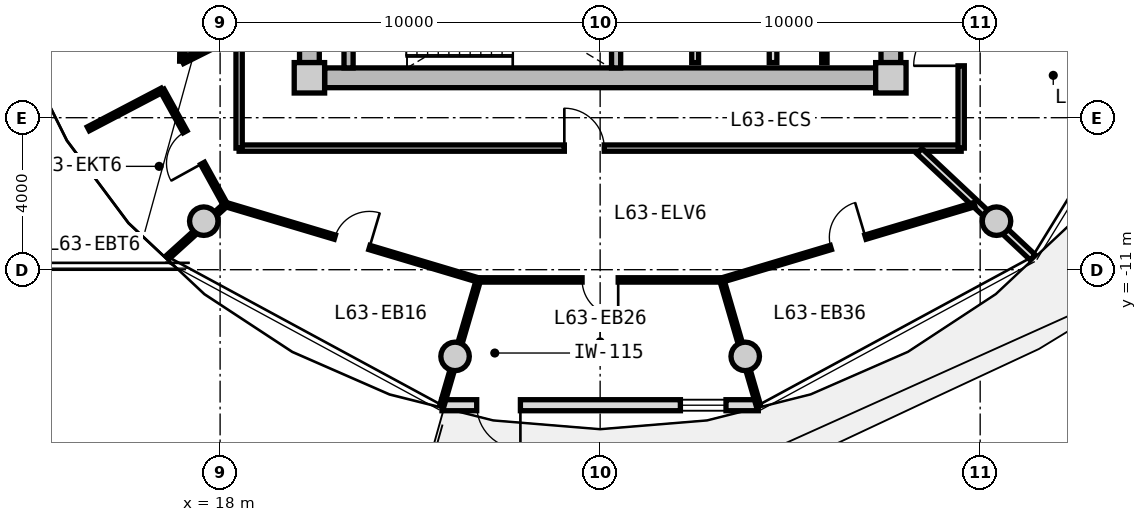
"""IFC4 building model, lengths in metres.
Left out: names, types, materials, properties, quantities, classifications, styles, units other than length and angle.
Written with IfcOpenShell. Run it as: python <this file> out.ifc"""

import sys

from ifc_helpers import new_model, si_unit, direction, frame, frame_2d, origin, origin_2d, place, context, subcontext, project, spatial, rectangle, circle, extrude, source, transform, mapped, element, fill, save


model = new_model("IFC4")
c1 = context("Model", 3, precision=1e-05, world=origin(), true_north=direction((0.0, 1.0)))
c2 = subcontext(c1, "Body", "Model", "MODEL_VIEW")
j1 = project(units=[si_unit("LENGTHUNIT", "METRE"), si_unit("PLANEANGLEUNIT", "RADIAN")], contexts=[c1])
p1 = place(None, origin())
s1 = spatial("IfcSite", under=j1, at=p1, CompositionType="ELEMENT")
p2 = place(p1, origin())
s2 = spatial("IfcBuilding", under=s1, at=p2, CompositionType="ELEMENT")
p3 = place(p2, frame((0.0, 0.0, 203.8)))
s3 = spatial("IfcBuildingStorey", under=s2, at=p3, CompositionType="ELEMENT", Elevation=203.8)
m1 = source(origin(), c2, "Body", "SweptSolid", [
    extrude(rectangle(XDim=0.8, YDim=0.8, at=origin_2d()), origin(), (0.0, 0.0, 1.0), 4.0),
])
for number, where, z_axis, x_axis in (
    (1, (20.35, -5.95, 0.0), (0.0, 0.0, 1.0), (1.0, 0.0, 0.0)),
    (2, (35.65, -5.95, 0.0), (0.0, 0.0, 1.0), (1.0, 0.0, 0.0)),
):
    element("IfcColumn", number, at=place(p3, frame(where, z_axis=z_axis, x_axis=x_axis)), inside=s3, PredefinedType="COLUMN", context=c2, shape_type="MappedRepresentation", body=[
        mapped(m1, transform((0.0, 0.0, 0.0), x_axis=(1.0, 0.0, 0.0), y_axis=(0.0, 1.0, 0.0), z_axis=(0.0, 0.0, 1.0), scale=1.0)),
    ])
m2 = source(origin(), c2, "Body", "SweptSolid", [
    extrude(rectangle(XDim=14.5, YDim=0.52, at=frame_2d((7.25, 0.0))), origin(), (0.0, 0.0, 1.0), 3.71),
])
p4 = place(p3, frame((35.25, -5.95, 0.0), z_axis=(0.0, 0.0, 1.0), x_axis=(-1.0, 0.0, 0.0)))
e3 = element("IfcWall", 3, at=p4, inside=s3, PredefinedType="SHEAR", context=c2, shape_type="MappedRepresentation", body=[
    mapped(m2, transform((0.0, 0.0, 0.0), x_axis=(1.0, 0.0, 0.0), y_axis=(0.0, 1.0, 0.0), z_axis=(0.0, 0.0, 1.0), scale=1.0)),
])
m3 = source(origin(), c2, "Body", "SweptSolid", [
    extrude(rectangle(XDim=11.1, YDim=0.52, at=frame_2d((5.55, 0.0))), origin(), (0.0, 0.0, 1.0), 3.71),
])
p5 = place(p3, frame((20.35, -5.55, 0.0), z_axis=(0.0, 0.0, 1.0), x_axis=(0.0, 1.0, 0.0)))
e4 = element("IfcWall", 4, at=p5, inside=s3, PredefinedType="SHEAR", context=c2, shape_type="MappedRepresentation", body=[
    mapped(m3, transform((0.0, 0.0, 0.0), x_axis=(1.0, 0.0, 0.0), y_axis=(0.0, 1.0, 0.0), z_axis=(0.0, 0.0, 1.0), scale=1.0)),
])
p6 = place(p5, frame((3.8, 0.0, 0.0)))
e5 = element("IfcOpeningElement", 5, at=p6, cuts=e4, PredefinedType="OPENING", context=c2, shape_type="SweptSolid", body=[
    extrude(rectangle(XDim=1.2, YDim=2.15, at=frame_2d((0.6, 1.075))), frame((0.0, 0.27, 0.0), z_axis=(0.0, -1.0, 0.0), x_axis=(1.0, 0.0, 0.0)), (0.0, 0.0, 1.0), 0.54),
])
p7 = place(p3, frame((35.65, 5.55, 0.0), z_axis=(0.0, 0.0, 1.0), x_axis=(0.0, -1.0, 0.0)))
e6 = element("IfcWall", 6, at=p7, inside=s3, PredefinedType="SHEAR", context=c2, shape_type="MappedRepresentation", body=[
    mapped(m3, transform((0.0, 0.0, 0.0), x_axis=(1.0, 0.0, 0.0), y_axis=(0.0, 1.0, 0.0), z_axis=(0.0, 0.0, 1.0), scale=1.0)),
])
p8 = place(p7, frame((5.65, 0.0, 0.0)))
e7 = element("IfcOpeningElement", 7, at=p8, cuts=e6, PredefinedType="OPENING", context=c2, shape_type="SweptSolid", body=[
    extrude(rectangle(XDim=1.2, YDim=2.15, at=frame_2d((0.6, 1.075))), frame((0.0, 0.27, 0.0), z_axis=(0.0, -1.0, 0.0), x_axis=(1.0, 0.0, 0.0)), (0.0, 0.0, 1.0), 0.54),
])
m4 = source(origin(), c2, "Body", "SweptSolid", [
    extrude(circle(Radius=0.375, at=origin_2d()), origin(), (0.0, 0.0, 1.0), 4.0),
])
for number, where, z_axis, x_axis in (
    (8, (17.57, -9.723, 0.0), (0.0, 0.0, 1.0), (1.0, 0.0, 0.0)),
    (9, (24.182, -13.281, 0.0), (0.0, 0.0, 1.0), (1.0, 0.0, 0.0)),
    (10, (31.818, -13.281, 0.0), (0.0, 0.0, 1.0), (1.0, 0.0, 0.0)),
    (11, (38.43, -9.723, 0.0), (0.0, 0.0, 1.0), (1.0, 0.0, 0.0)),
):
    element("IfcColumn", number, at=place(p3, frame(where, z_axis=z_axis, x_axis=x_axis)), inside=s3, PredefinedType="COLUMN", context=c2, shape_type="MappedRepresentation", body=[
        mapped(m4, transform((0.0, 0.0, 0.0), x_axis=(1.0, 0.0, 0.0), y_axis=(0.0, 1.0, 0.0), z_axis=(0.0, 0.0, 1.0), scale=1.0)),
    ])
m5 = source(origin(), c2, "Body", "SweptSolid", [
    extrude(rectangle(XDim=8.324, YDim=0.29, at=frame_2d((4.162, 0.0))), origin(), (0.0, 0.0, 1.0), 3.71),
])
p9 = place(p3, frame((32.162, -14.566, 0.0), z_axis=(0.0, 0.0, 1.0), x_axis=(-1.0, 0.0, 0.0)))
e12 = element("IfcWall", 12, at=p9, inside=s3, PredefinedType="SOLIDWALL", context=c2, shape_type="MappedRepresentation", body=[
    mapped(m5, transform((0.0, 0.0, 0.0), x_axis=(1.0, 0.0, 0.0), y_axis=(0.0, 1.0, 0.0), z_axis=(0.0, 0.0, 1.0), scale=1.0)),
])
p10 = place(p9, frame((6.26, 0.0, 0.0)))
e13 = element("IfcOpeningElement", 13, at=p10, cuts=e12, PredefinedType="OPENING", context=c2, shape_type="SweptSolid", body=[
    extrude(rectangle(XDim=1.15, YDim=2.25, at=frame_2d((0.575, 1.125))), frame((0.0, 0.155, 0.0), z_axis=(0.0, -1.0, 0.0), x_axis=(1.0, 0.0, 0.0)), (0.0, 0.0, 1.0), 0.31),
])
p11 = place(p9, frame((0.85, 0.0, 0.85)))
e14 = element("IfcOpeningElement", 14, at=p11, cuts=e12, PredefinedType="OPENING", context=c2, shape_type="SweptSolid", body=[
    extrude(rectangle(XDim=1.2, YDim=1.5, at=frame_2d((0.6, 0.75))), frame((0.0, 0.155, 0.0), z_axis=(0.0, -1.0, 0.0), x_axis=(1.0, 0.0, 0.0)), (0.0, 0.0, 1.0), 0.31),
])
m6 = source(origin(), c2, "Body", "SweptSolid", [
    extrude(rectangle(XDim=3.24, YDim=0.24, at=frame_2d((1.62, 0.0))), origin(), (0.0, 0.0, 1.0), 3.71),
])
for number, where, z_axis, x_axis in (
    (15, (21.38, -5.69, 0.0), (0.0, 0.0, 1.0), (0.0, 1.0, 0.0)),
    (16, (28.42, -5.69, 0.0), (0.0, 0.0, 1.0), (0.0, 1.0, 0.0)),
):
    element("IfcWall", number, at=place(p3, frame(where, z_axis=z_axis, x_axis=x_axis)), inside=s3, PredefinedType="PARTITIONING", context=c2, shape_type="MappedRepresentation", body=[
        mapped(m6, transform((0.0, 0.0, 0.0), x_axis=(1.0, 0.0, 0.0), y_axis=(0.0, 1.0, 0.0), z_axis=(0.0, 0.0, 1.0), scale=1.0)),
    ])
m7 = source(origin(), c2, "Body", "SweptSolid", [
    extrude(rectangle(XDim=3.8, YDim=0.2, at=frame_2d((1.9, 0.0))), origin(), (0.0, 0.0, 1.0), 3.695),
])
p12 = place(p3, frame((32.55, -5.55, 0.0), z_axis=(0.0, 0.0, 1.0), x_axis=(0.0, 1.0, 0.0)))
e17 = element("IfcWall", 17, at=p12, inside=s3, PredefinedType="PARTITIONING", context=c2, shape_type="MappedRepresentation", body=[
    mapped(m7, transform((0.0, 0.0, 0.0), x_axis=(1.0, 0.0, 0.0), y_axis=(0.0, 1.0, 0.0), z_axis=(0.0, 0.0, 1.0), scale=1.0)),
])
m8 = source(origin(), c2, "Body", "SweptSolid", [
    extrude(rectangle(XDim=4.2, YDim=0.18, at=frame_2d((2.1, 0.0))), origin(), (0.0, 0.0, 1.0), 3.695),
])
p13 = place(p3, frame((30.5, -5.55, 0.0), z_axis=(0.0, 0.0, 1.0), x_axis=(0.0, 1.0, 0.0)))
e18 = element("IfcWall", 18, at=p13, inside=s3, PredefinedType="PARTITIONING", context=c2, shape_type="MappedRepresentation", body=[
    mapped(m8, transform((0.0, 0.0, 0.0), x_axis=(1.0, 0.0, 0.0), y_axis=(0.0, 1.0, 0.0), z_axis=(0.0, 0.0, 1.0), scale=1.0)),
])
m9 = source(origin(), c2, "Body", "SweptSolid", [
    extrude(rectangle(XDim=3.8, YDim=0.14, at=frame_2d((1.9, 0.0))), origin(), (0.0, 0.0, 1.0), 3.695),
])
p14 = place(p3, frame((33.9, -5.55, 0.0), z_axis=(0.0, 0.0, 1.0), x_axis=(0.0, 1.0, 0.0)))
e19 = element("IfcWall", 19, at=p14, inside=s3, PredefinedType="PARTITIONING", context=c2, shape_type="MappedRepresentation", body=[
    mapped(m9, transform((0.0, 0.0, 0.0), x_axis=(1.0, 0.0, 0.0), y_axis=(0.0, 1.0, 0.0), z_axis=(0.0, 0.0, 1.0), scale=1.0)),
])
m10 = source(origin(), c2, "Body", "SweptSolid", [
    extrude(rectangle(XDim=19.0, YDim=0.165, at=frame_2d((9.5, 0.0))), origin(), (0.0, 0.0, 1.0), 3.695),
])
p15 = place(p3, frame((37.5, -7.8, 0.0), z_axis=(0.0, 0.0, 1.0), x_axis=(-1.0, 0.0, 0.0)))
e20 = element("IfcWall", 20, at=p15, inside=s3, PredefinedType="PARTITIONING", context=c2, shape_type="MappedRepresentation", body=[
    mapped(m10, transform((0.0, 0.0, 0.0), x_axis=(1.0, 0.0, 0.0), y_axis=(0.0, 1.0, 0.0), z_axis=(0.0, 0.0, 1.0), scale=1.0)),
])
p16 = place(p15, frame((9.392, 0.0, 0.0)))
e21 = element("IfcOpeningElement", 21, at=p16, cuts=e20, PredefinedType="OPENING", context=c2, shape_type="SweptSolid", body=[
    extrude(rectangle(XDim=1.05, YDim=2.15, at=frame_2d((0.525, 1.075))), frame((0.0, 0.093, 0.0), z_axis=(0.0, -1.0, 0.0), x_axis=(1.0, 0.0, 0.0)), (0.0, 0.0, 1.0), 0.185),
])
m11 = source(origin(), c2, "Body", "SweptSolid", [
    extrude(rectangle(XDim=6.88, YDim=0.165, at=frame_2d((3.44, 0.0))), origin(), (0.0, 0.0, 1.0), 3.695),
])
p17 = place(p3, frame((18.5, -7.8, 0.0), z_axis=(0.0, 0.0, 1.0), x_axis=(0.0, 1.0, 0.0)))
e22 = element("IfcWall", 22, at=p17, inside=s3, PredefinedType="PARTITIONING", context=c2, shape_type="MappedRepresentation", body=[
    mapped(m11, transform((0.0, 0.0, 0.0), x_axis=(1.0, 0.0, 0.0), y_axis=(0.0, 1.0, 0.0), z_axis=(0.0, 0.0, 1.0), scale=1.0)),
])
p18 = place(p3, frame((37.5, -0.92, 0.0), z_axis=(0.0, 0.0, 1.0), x_axis=(0.0, -1.0, 0.0)))
e23 = element("IfcWall", 23, at=p18, inside=s3, PredefinedType="PARTITIONING", context=c2, shape_type="MappedRepresentation", body=[
    mapped(m11, transform((0.0, 0.0, 0.0), x_axis=(1.0, 0.0, 0.0), y_axis=(0.0, 1.0, 0.0), z_axis=(0.0, 0.0, 1.0), scale=1.0)),
])
p19 = place(p18, frame((3.464, 0.0, 0.0)))
e24 = element("IfcOpeningElement", 24, at=p19, cuts=e23, PredefinedType="OPENING", context=c2, shape_type="SweptSolid", body=[
    extrude(rectangle(XDim=1.25, YDim=2.2, at=frame_2d((0.625, 1.1))), frame((0.0, 0.093, 0.0), z_axis=(0.0, -1.0, 0.0), x_axis=(1.0, 0.0, 0.0)), (0.0, 0.0, 1.0), 0.185),
])
m12 = source(origin(), c2, "Body", "SweptSolid", [
    extrude(rectangle(XDim=4.089, YDim=0.19, at=frame_2d((2.044, 0.0))), origin(), (0.0, 0.0, 1.0), 3.295),
])
p20 = place(p3, frame((36.402, -7.88, 0.0), z_axis=(0.0, 0.0, 1.0), x_axis=(0.729401273609, -0.684086092577, 0.0)))
e25 = element("IfcWall", 25, at=p20, inside=s3, PredefinedType="PARTITIONING", context=c2, shape_type="MappedRepresentation", body=[
    mapped(m12, transform((0.0, 0.0, 0.0), x_axis=(1.0, 0.0, 0.0), y_axis=(0.0, 1.0, 0.0), z_axis=(0.0, 0.0, 1.0), scale=1.0)),
])
m13 = source(origin(), c2, "Body", "SweptSolid", [
    extrude(rectangle(XDim=6.936, YDim=0.115, at=frame_2d((3.468, 0.0))), origin(), (0.0, 0.0, 1.0), 3.695),
])
p21 = place(p3, frame((18.151, -9.287, 0.0), z_axis=(0.0, 0.0, 1.0), x_axis=(0.958186895835, -0.286143098205, 0.0)))
e26 = element("IfcWall", 26, at=p21, inside=s3, PredefinedType="PARTITIONING", context=c2, shape_type="MappedRepresentation", body=[
    mapped(m13, transform((0.0, 0.0, 0.0), x_axis=(1.0, 0.0, 0.0), y_axis=(0.0, 1.0, 0.0), z_axis=(0.0, 0.0, 1.0), scale=1.0)),
])
p22 = place(p21, frame((2.993, 0.0, 0.0)))
e27 = element("IfcOpeningElement", 27, at=p22, cuts=e26, PredefinedType="OPENING", context=c2, shape_type="SweptSolid", body=[
    extrude(rectangle(XDim=0.95, YDim=2.1, at=frame_2d((0.475, 1.05))), frame((0.0, 0.067, 0.0), z_axis=(0.0, -1.0, 0.0), x_axis=(1.0, 0.0, 0.0)), (0.0, 0.0, 1.0), 0.135),
])
m14 = source(origin(), c2, "Body", "SweptSolid", [
    extrude(rectangle(XDim=2.072, YDim=0.115, at=frame_2d((1.036, 0.0))), origin(), (0.0, 0.0, 1.0), 3.295),
])
p23 = place(p3, frame((18.151, -9.287, 0.0), z_axis=(0.0, 0.0, 1.0), x_axis=(-0.741410125356, -0.671052178314, 0.0)))
e28 = element("IfcWall", 28, at=p23, inside=s3, PredefinedType="PARTITIONING", context=c2, shape_type="MappedRepresentation", body=[
    mapped(m14, transform((0.0, 0.0, 0.0), x_axis=(1.0, 0.0, 0.0), y_axis=(0.0, 1.0, 0.0), z_axis=(0.0, 0.0, 1.0), scale=1.0)),
])
m15 = source(origin(), c2, "Body", "SweptSolid", [
    extrude(rectangle(XDim=6.404, YDim=0.115, at=frame_2d((3.202, 0.0))), origin(), (0.0, 0.0, 1.0), 3.695),
])
p24 = place(p3, frame((24.798, -11.269, 0.0), z_axis=(0.0, 0.0, 1.0), x_axis=(1.0, 0.0, 0.0)))
e29 = element("IfcWall", 29, at=p24, inside=s3, PredefinedType="PARTITIONING", context=c2, shape_type="MappedRepresentation", body=[
    mapped(m15, transform((0.0, 0.0, 0.0), x_axis=(1.0, 0.0, 0.0), y_axis=(0.0, 1.0, 0.0), z_axis=(0.0, 0.0, 1.0), scale=1.0)),
])
p25 = place(p24, frame((2.727, 0.0, 0.0)))
e30 = element("IfcOpeningElement", 30, at=p25, cuts=e29, PredefinedType="OPENING", context=c2, shape_type="SweptSolid", body=[
    extrude(rectangle(XDim=0.95, YDim=2.1, at=frame_2d((0.475, 1.05))), frame((0.0, 0.067, 0.0), z_axis=(0.0, -1.0, 0.0), x_axis=(1.0, 0.0, 0.0)), (0.0, 0.0, 1.0), 0.135),
])
m16 = source(origin(), c2, "Body", "SweptSolid", [
    extrude(rectangle(XDim=3.454, YDim=0.115, at=frame_2d((1.727, 0.0))), origin(), (0.0, 0.0, 1.0), 3.295),
])
p26 = place(p3, frame((24.798, -11.269, 0.0), z_axis=(0.0, 0.0, 1.0), x_axis=(-0.279348499358, -0.960189781193, 0.0)))
e31 = element("IfcWall", 31, at=p26, inside=s3, PredefinedType="PARTITIONING", context=c2, shape_type="MappedRepresentation", body=[
    mapped(m16, transform((0.0, 0.0, 0.0), x_axis=(1.0, 0.0, 0.0), y_axis=(0.0, 1.0, 0.0), z_axis=(0.0, 0.0, 1.0), scale=1.0)),
])
p27 = place(p3, frame((31.203, -11.272, 0.0), z_axis=(0.0, 0.0, 1.0), x_axis=(0.958186895835, 0.286143098205, 0.0)))
e32 = element("IfcWall", 32, at=p27, inside=s3, PredefinedType="PARTITIONING", context=c2, shape_type="MappedRepresentation", body=[
    mapped(m13, transform((0.0, 0.0, 0.0), x_axis=(1.0, 0.0, 0.0), y_axis=(0.0, 1.0, 0.0), z_axis=(0.0, 0.0, 1.0), scale=1.0)),
])
p28 = place(p27, frame((2.993, 0.0, 0.0)))
e33 = element("IfcOpeningElement", 33, at=p28, cuts=e32, PredefinedType="OPENING", context=c2, shape_type="SweptSolid", body=[
    extrude(rectangle(XDim=0.95, YDim=2.1, at=frame_2d((0.475, 1.05))), frame((0.0, 0.067, 0.0), z_axis=(0.0, -1.0, 0.0), x_axis=(1.0, 0.0, 0.0)), (0.0, 0.0, 1.0), 0.135),
])
m17 = source(origin(), c2, "Body", "SweptSolid", [
    extrude(rectangle(XDim=3.451, YDim=0.115, at=frame_2d((1.726, 0.0))), origin(), (0.0, 0.0, 1.0), 3.295),
])
p29 = place(p3, frame((31.203, -11.272, 0.0), z_axis=(0.0, 0.0, 1.0), x_axis=(0.279361559083, -0.960185981624, 0.0)))
e34 = element("IfcWall", 34, at=p29, inside=s3, PredefinedType="PARTITIONING", context=c2, shape_type="MappedRepresentation", body=[
    mapped(m17, transform((0.0, 0.0, 0.0), x_axis=(1.0, 0.0, 0.0), y_axis=(0.0, 1.0, 0.0), z_axis=(0.0, 0.0, 1.0), scale=1.0)),
])
m18 = source(origin(), c2, "Body", "SweptSolid", [
    extrude(rectangle(XDim=1.638, YDim=0.14, at=frame_2d((0.819, 0.0))), origin(), (0.0, 0.0, 1.0), 3.695),
])
p30 = place(p3, frame((18.47, -4.778, 0.0), z_axis=(0.0, 0.0, 1.0), x_axis=(-0.893919977945, -0.448226586707, 0.0)))
e35 = element("IfcWall", 35, at=p30, inside=s3, PredefinedType="PARTITIONING", context=c2, shape_type="MappedRepresentation", body=[
    mapped(m18, transform((0.0, 0.0, 0.0), x_axis=(1.0, 0.0, 0.0), y_axis=(0.0, 1.0, 0.0), z_axis=(0.0, 0.0, 1.0), scale=1.0)),
])
m19 = source(origin(), c2, "Body", "SweptSolid", [
    extrude(rectangle(XDim=2.759, YDim=0.14, at=frame_2d((1.379, 0.0))), origin(), (0.0, 0.0, 1.0), 3.695),
])
p31 = place(p3, frame((17.005, -5.513, 0.0), z_axis=(0.0, 0.0, 1.0), x_axis=(0.01194710728, 0.999928630767, 0.0)))
e36 = element("IfcWall", 36, at=p31, inside=s3, PredefinedType="PARTITIONING", context=c2, shape_type="MappedRepresentation", body=[
    mapped(m19, transform((0.0, 0.0, 0.0), x_axis=(1.0, 0.0, 0.0), y_axis=(0.0, 1.0, 0.0), z_axis=(0.0, 0.0, 1.0), scale=1.0)),
])
p32 = place(p31, frame((0.919, 0.0, 0.0)))
e37 = element("IfcOpeningElement", 37, at=p32, cuts=e36, PredefinedType="OPENING", context=c2, shape_type="SweptSolid", body=[
    extrude(rectangle(XDim=0.92, YDim=2.1, at=frame_2d((0.46, 1.05))), frame((0.0, 0.08, 0.0), z_axis=(0.0, -1.0, 0.0), x_axis=(1.0, 0.0, 0.0)), (0.0, 0.0, 1.0), 0.16),
])
m20 = source(origin(), c2, "Body", "SweptSolid", [
    extrude(rectangle(XDim=2.193, YDim=0.115, at=frame_2d((1.097, 0.0))), origin(), (0.0, 0.0, 1.0), 3.695),
])
p33 = place(p3, frame((16.475, -6.275, 0.0), z_axis=(0.0, 0.0, 1.0), x_axis=(-0.885783595046, -0.464098505435, 0.0)))
e38 = element("IfcWall", 38, at=p33, inside=s3, PredefinedType="PARTITIONING", context=c2, shape_type="MappedRepresentation", body=[
    mapped(m20, transform((0.0, 0.0, 0.0), x_axis=(1.0, 0.0, 0.0), y_axis=(0.0, 1.0, 0.0), z_axis=(0.0, 0.0, 1.0), scale=1.0)),
])
m21 = source(origin(), c2, "Body", "SweptSolid", [
    extrude(rectangle(XDim=3.45, YDim=0.115, at=frame_2d((1.725, 0.0))), origin(), (0.0, 0.0, 1.0), 3.695),
])
p34 = place(p3, frame((16.475, -6.275, 0.0), z_axis=(0.0, 0.0, 1.0), x_axis=(0.483659007882, -0.875256513312, 0.0)))
e39 = element("IfcWall", 39, at=p34, inside=s3, PredefinedType="PARTITIONING", context=c2, shape_type="MappedRepresentation", body=[
    mapped(m21, transform((0.0, 0.0, 0.0), x_axis=(1.0, 0.0, 0.0), y_axis=(0.0, 1.0, 0.0), z_axis=(0.0, 0.0, 1.0), scale=1.0)),
])
p35 = place(p34, frame((1.25, 0.0, 0.0)))
e40 = element("IfcOpeningElement", 40, at=p35, cuts=e39, PredefinedType="OPENING", context=c2, shape_type="SweptSolid", body=[
    extrude(rectangle(XDim=0.95, YDim=2.1, at=frame_2d((0.475, 1.05))), frame((0.0, 0.067, 0.0), z_axis=(0.0, -1.0, 0.0), x_axis=(1.0, 0.0, 0.0)), (0.0, 0.0, 1.0), 0.135),
])
m22 = source(origin(), c2, "Body", "SweptSolid", [
    extrude(rectangle(XDim=1.15, YDim=2.25, at=frame_2d((0.575, 1.125))), frame((0.0, 0.025, 0.0), z_axis=(0.0, -1.0, 0.0), x_axis=(1.0, 0.0, 0.0)), (0.0, 0.0, 1.0), 0.05),
])
p36 = place(p10, origin())
e41 = element("IfcDoor", 41, at=p36, inside=s3, OperationType="SINGLE_SWING_LEFT", PredefinedType="DOOR", context=c2, shape_type="MappedRepresentation", body=[
    mapped(m22, transform((0.0, 0.0, 0.0), x_axis=(1.0, 0.0, 0.0), y_axis=(0.0, 1.0, 0.0), z_axis=(0.0, 0.0, 1.0), scale=1.0)),
])
fill(e13, e41)
m23 = source(origin(), c2, "Body", "SweptSolid", [
    extrude(rectangle(XDim=1.2, YDim=1.5, at=frame_2d((0.6, 0.75))), frame((0.0, 0.03, 0.0), z_axis=(0.0, -1.0, 0.0), x_axis=(1.0, 0.0, 0.0)), (0.0, 0.0, 1.0), 0.06),
])
p37 = place(p11, origin())
e42 = element("IfcWindow", 42, at=p37, inside=s3, PartitioningType="SINGLE_PANEL", PredefinedType="WINDOW", context=c2, shape_type="MappedRepresentation", body=[
    mapped(m23, transform((0.0, 0.0, 0.0), x_axis=(1.0, 0.0, 0.0), y_axis=(0.0, 1.0, 0.0), z_axis=(0.0, 0.0, 1.0), scale=1.0)),
])
fill(e14, e42)
m24 = source(origin(), c2, "Body", "SweptSolid", [
    extrude(rectangle(XDim=1.05, YDim=2.15, at=frame_2d((0.525, 1.075))), frame((0.0, 0.025, 0.0), z_axis=(0.0, -1.0, 0.0), x_axis=(1.0, 0.0, 0.0)), (0.0, 0.0, 1.0), 0.05),
])
p38 = place(p16, frame((1.05, 0.0, 0.0), z_axis=(0.0, 0.0, 1.0), x_axis=(-1.0, 0.0, 0.0)))
e43 = element("IfcDoor", 43, at=p38, inside=s3, OperationType="SINGLE_SWING_LEFT", PredefinedType="DOOR", context=c2, shape_type="MappedRepresentation", body=[
    mapped(m24, transform((0.0, 0.0, 0.0), x_axis=(1.0, 0.0, 0.0), y_axis=(0.0, 1.0, 0.0), z_axis=(0.0, 0.0, 1.0), scale=1.0)),
])
fill(e21, e43)
m25 = source(origin(), c2, "Body", "SweptSolid", [
    extrude(rectangle(XDim=0.95, YDim=2.1, at=frame_2d((0.475, 1.05))), frame((0.0, 0.025, 0.0), z_axis=(0.0, -1.0, 0.0), x_axis=(1.0, 0.0, 0.0)), (0.0, 0.0, 1.0), 0.05),
])
p39 = place(p35, frame((0.95, 0.0, 0.0), z_axis=(0.0, 0.0, 1.0), x_axis=(-1.0, 0.0, 0.0)))
e44 = element("IfcDoor", 44, at=p39, inside=s3, OperationType="SINGLE_SWING_LEFT", PredefinedType="DOOR", context=c2, shape_type="MappedRepresentation", body=[
    mapped(m25, transform((0.0, 0.0, 0.0), x_axis=(1.0, 0.0, 0.0), y_axis=(0.0, 1.0, 0.0), z_axis=(0.0, 0.0, 1.0), scale=1.0)),
])
fill(e40, e44)
p40 = place(p22, origin())
e45 = element("IfcDoor", 45, at=p40, inside=s3, OperationType="SINGLE_SWING_RIGHT", PredefinedType="DOOR", context=c2, shape_type="MappedRepresentation", body=[
    mapped(m25, transform((0.0, 0.0, 0.0), x_axis=(1.0, 0.0, 0.0), y_axis=(0.0, 1.0, 0.0), z_axis=(0.0, 0.0, 1.0), scale=1.0)),
])
fill(e27, e45)
p41 = place(p25, frame((0.95, 0.0, 0.0), z_axis=(0.0, 0.0, 1.0), x_axis=(-1.0, 0.0, 0.0)))
e46 = element("IfcDoor", 46, at=p41, inside=s3, OperationType="SINGLE_SWING_LEFT", PredefinedType="DOOR", context=c2, shape_type="MappedRepresentation", body=[
    mapped(m25, transform((0.0, 0.0, 0.0), x_axis=(1.0, 0.0, 0.0), y_axis=(0.0, 1.0, 0.0), z_axis=(0.0, 0.0, 1.0), scale=1.0)),
])
fill(e30, e46)
p42 = place(p28, origin())
e47 = element("IfcDoor", 47, at=p42, inside=s3, OperationType="SINGLE_SWING_RIGHT", PredefinedType="DOOR", context=c2, shape_type="MappedRepresentation", body=[
    mapped(m25, transform((0.0, 0.0, 0.0), x_axis=(1.0, 0.0, 0.0), y_axis=(0.0, 1.0, 0.0), z_axis=(0.0, 0.0, 1.0), scale=1.0)),
])
fill(e33, e47)
m26 = source(origin(), c2, "Body", "SweptSolid", [
    extrude(rectangle(XDim=1.25, YDim=2.2, at=frame_2d((0.625, 1.1))), frame((0.0, 0.025, 0.0), z_axis=(0.0, -1.0, 0.0), x_axis=(1.0, 0.0, 0.0)), (0.0, 0.0, 1.0), 0.05),
])
p43 = place(p19, frame((1.25, 0.0, 0.0), z_axis=(0.0, 0.0, 1.0), x_axis=(-1.0, 0.0, 0.0)))
e48 = element("IfcDoor", 48, at=p43, inside=s3, OperationType="SINGLE_SWING_LEFT", PredefinedType="DOOR", context=c2, shape_type="MappedRepresentation", body=[
    mapped(m26, transform((0.0, 0.0, 0.0), x_axis=(1.0, 0.0, 0.0), y_axis=(0.0, 1.0, 0.0), z_axis=(0.0, 0.0, 1.0), scale=1.0)),
])
fill(e24, e48)
save(model, sys.argv[1])
